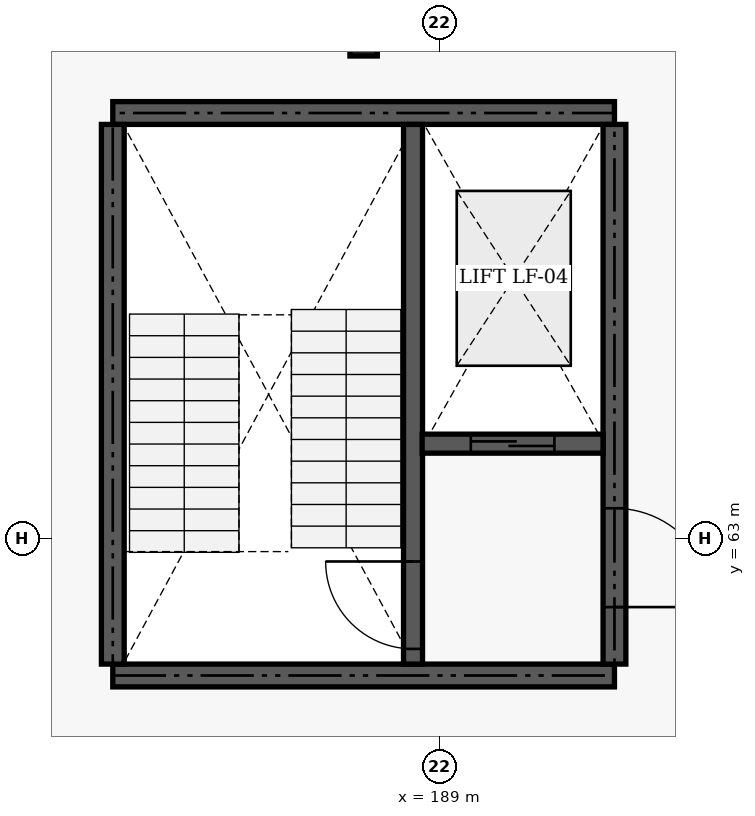
"""IFC4 building model, lengths in metres.
Left out: names, types, materials, properties, quantities, classifications, styles, units other than length and angle.
Written with IfcOpenShell. Run it as: python <this file> out.ifc"""

import sys

from ifc_helpers import new_model, si_unit, direction, frame, frame_2d, origin, origin_2d, place, context, subcontext, project, spatial, rectangle, i_section, extrude, element, fill, save


model = new_model("IFC4")
c1 = context("Model", 3, precision=1e-05, world=origin(), true_north=direction((0.0, 1.0)))
c2 = subcontext(c1, "Body", "Model", "MODEL_VIEW")
j1 = project(units=[si_unit("LENGTHUNIT", "METRE"), si_unit("PLANEANGLEUNIT", "RADIAN")], contexts=[c1])
p1 = place(None, origin())
s1 = spatial("IfcSite", under=j1, at=p1, CompositionType="ELEMENT")
p2 = place(p1, origin())
s2 = spatial("IfcBuilding", under=s1, at=p2, CompositionType="ELEMENT")
p3 = place(p2, frame((0.0, 0.0, 5.4)))
s3 = spatial("IfcBuildingStorey", under=s2, at=p3, CompositionType="ELEMENT", Elevation=5.4)
p4 = place(p3, frame((188.0, 69.5, 0.0), z_axis=(0.0, 0.0, 1.0), x_axis=(0.0, -1.0, 0.0)))
e1 = element("IfcColumn", 1, at=p4, inside=s3, PredefinedType="COLUMN", context=c2, shape_type="SweptSolid", body=[
    extrude(i_section(OverallWidth=0.3, OverallDepth=0.36, WebThickness=0.012, FlangeThickness=0.022, FilletRadius=0.027, at=origin_2d()), origin(), (0.0, 0.0, 1.0), 4.2),
])
for number, where, z_axis, x_axis in (
    (2, (184.7, 61.2, 0.0), (0.0, 0.0, 1.0), (1.0, 0.0, 0.0)),
    (3, (184.7, 68.6, 0.0), (0.0, 0.0, 1.0), (1.0, 0.0, 0.0)),
):
    element("IfcWall", number, at=place(p3, frame(where, z_axis=z_axis, x_axis=x_axis)), inside=s3, PredefinedType="SHEAR", context=c2, shape_type="SweptSolid", body=[
        extrude(rectangle(XDim=6.6, YDim=0.3, at=frame_2d((3.3, 0.0))), origin(), (0.0, 0.0, 1.0), 4.2),
    ])
p5 = place(p3, frame((184.7, 61.35, 0.0), z_axis=(0.0, 0.0, 1.0), x_axis=(0.0, 1.0, 0.0)))
e4 = element("IfcWall", 4, at=p5, inside=s3, PredefinedType="SHEAR", context=c2, shape_type="SweptSolid", body=[
    extrude(rectangle(XDim=7.1, YDim=0.3, at=frame_2d((3.55, 0.0))), origin(), (0.0, 0.0, 1.0), 4.2),
])
p6 = place(p3, frame((191.3, 61.35, 0.0), z_axis=(0.0, 0.0, 1.0), x_axis=(0.0, 1.0, 0.0)))
e5 = element("IfcWall", 5, at=p6, inside=s3, PredefinedType="SHEAR", context=c2, shape_type="SweptSolid", body=[
    extrude(rectangle(XDim=7.1, YDim=0.3, at=frame_2d((3.55, 0.0))), origin(), (0.0, 0.0, 1.0), 4.2),
])
p7 = place(p6, frame((0.75, 0.0, 0.0)))
e6 = element("IfcOpeningElement", 6, at=p7, cuts=e5, PredefinedType="OPENING", context=c2, shape_type="SweptSolid", body=[
    extrude(rectangle(XDim=1.3, YDim=2.15, at=frame_2d((0.65, 1.075))), frame((0.0, 0.16, 0.0), z_axis=(0.0, -1.0, 0.0), x_axis=(1.0, 0.0, 0.0)), (0.0, 0.0, 1.0), 0.32),
])
p8 = place(p3, frame((188.65, 61.35, 0.0), z_axis=(0.0, 0.0, 1.0), x_axis=(0.0, 1.0, 0.0)))
e7 = element("IfcWall", 7, at=p8, inside=s3, PredefinedType="SHEAR", context=c2, shape_type="SweptSolid", body=[
    extrude(rectangle(XDim=7.1, YDim=0.25, at=frame_2d((3.55, 0.0))), origin(), (0.0, 0.0, 1.0), 4.2),
])
p9 = place(p8, frame((0.2, 0.0, 0.0)))
e8 = element("IfcOpeningElement", 8, at=p9, cuts=e7, PredefinedType="OPENING", context=c2, shape_type="SweptSolid", body=[
    extrude(rectangle(XDim=1.15, YDim=2.15, at=frame_2d((0.575, 1.075))), frame((0.0, 0.135, 0.0), z_axis=(0.0, -1.0, 0.0), x_axis=(1.0, 0.0, 0.0)), (0.0, 0.0, 1.0), 0.27),
])
p10 = place(p3, frame((188.77, 64.25, 0.0), z_axis=(0.0, 0.0, 1.0), x_axis=(1.0, 0.0, 0.0)))
e9 = element("IfcWall", 9, at=p10, inside=s3, PredefinedType="SHEAR", context=c2, shape_type="SweptSolid", body=[
    extrude(rectangle(XDim=2.38, YDim=0.25, at=frame_2d((1.19, 0.0))), origin(), (0.0, 0.0, 1.0), 4.2),
])
p11 = place(p10, frame((0.64, 0.0, 0.0)))
e10 = element("IfcOpeningElement", 10, at=p11, cuts=e9, PredefinedType="OPENING", context=c2, shape_type="SweptSolid", body=[
    extrude(rectangle(XDim=1.1, YDim=2.15, at=frame_2d((0.55, 1.075))), frame((0.0, 0.135, 0.0), z_axis=(0.0, -1.0, 0.0), x_axis=(1.0, 0.0, 0.0)), (0.0, 0.0, 1.0), 0.27),
])
p12 = place(p7, frame((1.3, 0.0, 0.0), z_axis=(0.0, 0.0, 1.0), x_axis=(-1.0, 0.0, 0.0)))
e11 = element("IfcDoor", 11, at=p12, inside=s3, OperationType="DOUBLE_DOOR_SINGLE_SWING", PredefinedType="DOOR", context=c2, shape_type="SweptSolid", body=[
    extrude(rectangle(XDim=1.3, YDim=2.15, at=frame_2d((0.65, 1.075))), frame((0.0, 0.025, 0.0), z_axis=(0.0, -1.0, 0.0), x_axis=(1.0, 0.0, 0.0)), (0.0, 0.0, 1.0), 0.05),
])
fill(e6, e11)
p13 = place(p9, frame((1.15, 0.0, 0.0), z_axis=(0.0, 0.0, 1.0), x_axis=(-1.0, 0.0, 0.0)))
e12 = element("IfcDoor", 12, at=p13, inside=s3, OperationType="SINGLE_SWING_RIGHT", PredefinedType="DOOR", context=c2, shape_type="SweptSolid", body=[
    extrude(rectangle(XDim=1.15, YDim=2.15, at=frame_2d((0.575, 1.075))), frame((0.0, 0.025, 0.0), z_axis=(0.0, -1.0, 0.0), x_axis=(1.0, 0.0, 0.0)), (0.0, 0.0, 1.0), 0.05),
])
fill(e8, e12)
p14 = place(p11, origin())
e13 = element("IfcDoor", 13, at=p14, inside=s3, OperationType="SLIDING_TO_LEFT", PredefinedType="DOOR", context=c2, shape_type="SweptSolid", body=[
    extrude(rectangle(XDim=1.1, YDim=2.15, at=frame_2d((0.55, 1.075))), frame((0.0, 0.025, 0.0), z_axis=(0.0, -1.0, 0.0), x_axis=(1.0, 0.0, 0.0)), (0.0, 0.0, 1.0), 0.05),
])
fill(e10, e13)
save(model, sys.argv[1])
